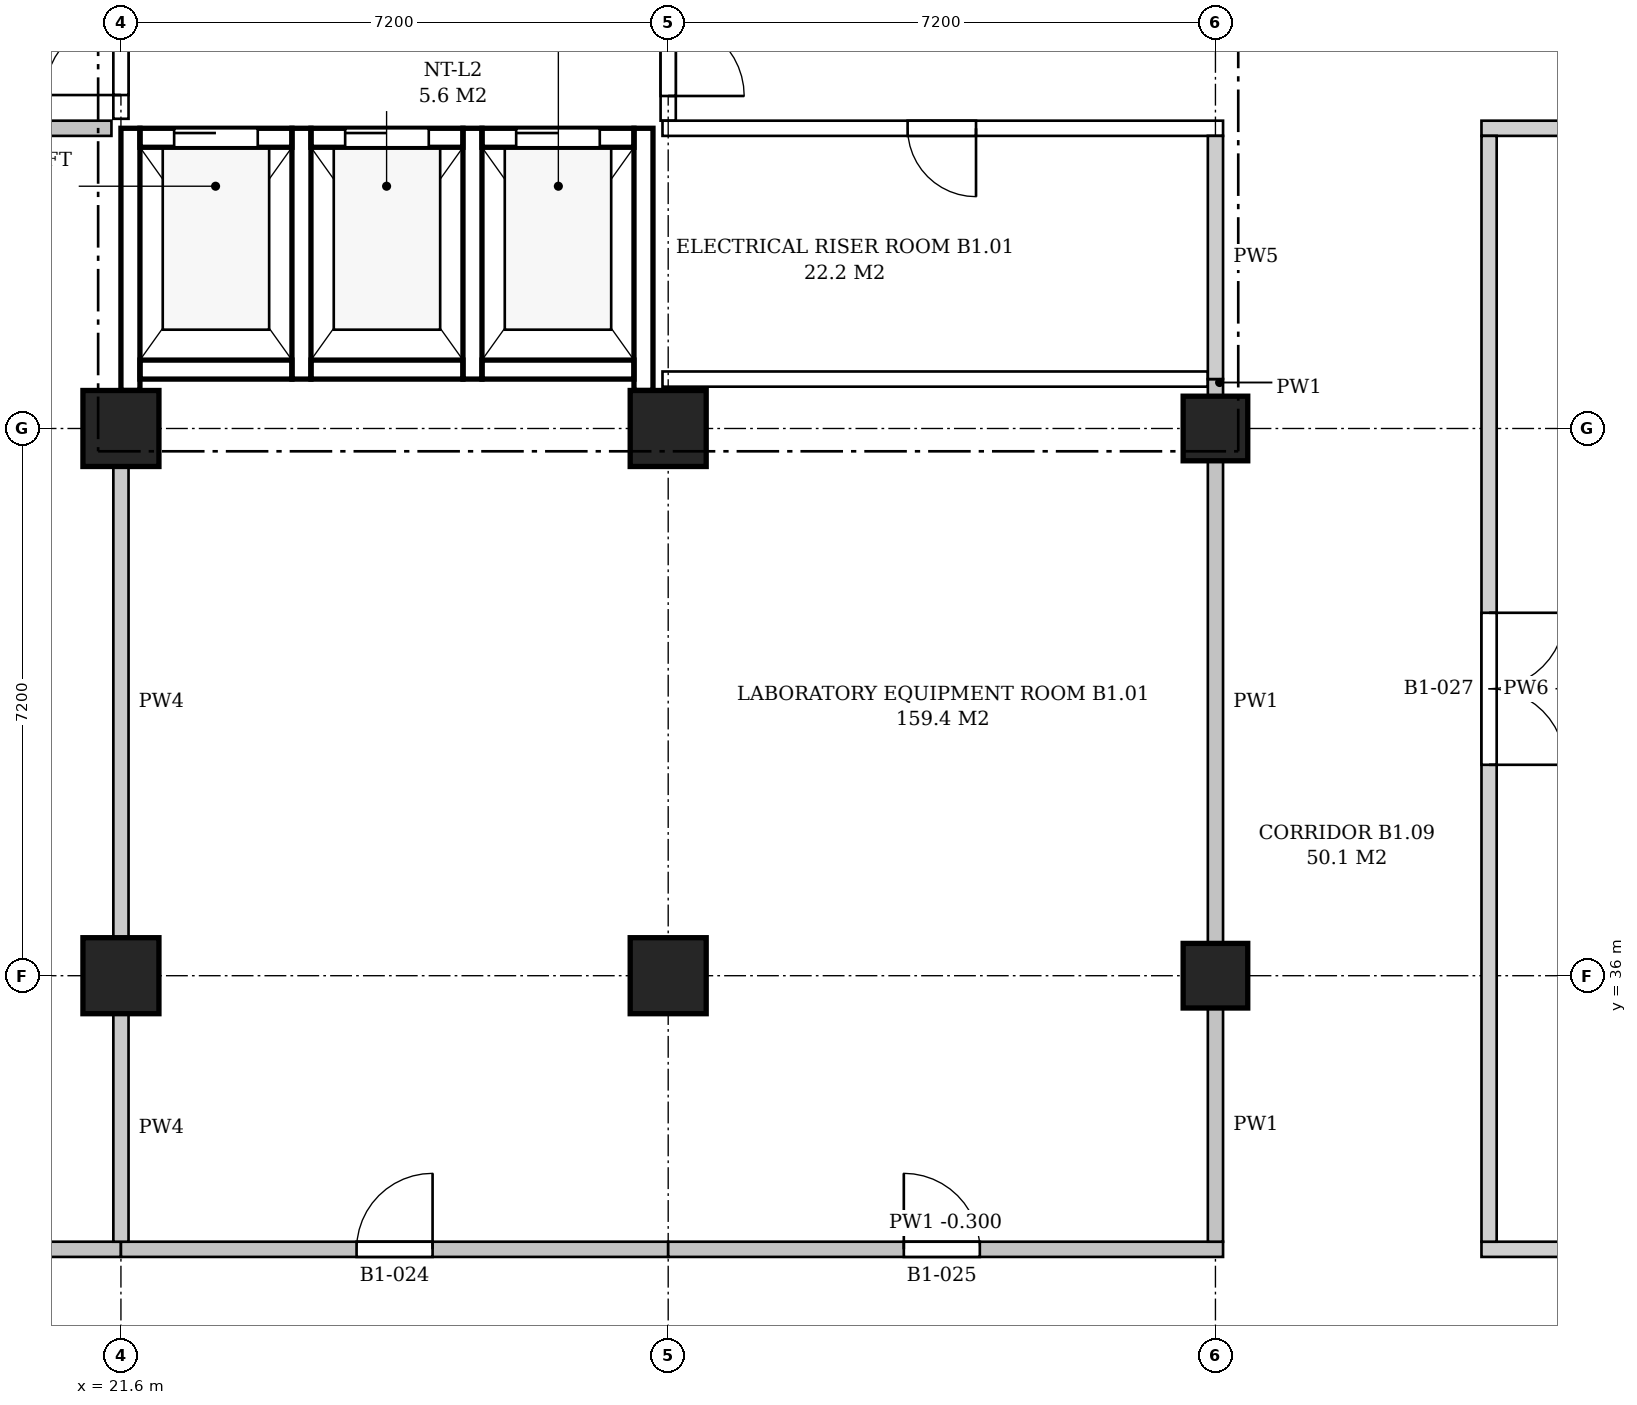
"""IFC4 building model, lengths in metres.
Left out: names, types, materials, properties, quantities, classifications, styles, units other than length and angle.
Written with IfcOpenShell. Run it as: python <this file> out.ifc"""

import sys

from ifc_helpers import new_model, si_unit, direction, frame, frame_2d, origin, origin_2d, place, context, subcontext, project, spatial, polyline, rectangle, outline, extrude, element, fill, save


model = new_model("IFC4")
c1 = context("Model", 3, precision=1e-05, world=origin(), true_north=direction((0.0, 1.0)))
c2 = subcontext(c1, "Body", "Model", "MODEL_VIEW")
j1 = project(units=[si_unit("LENGTHUNIT", "METRE"), si_unit("PLANEANGLEUNIT", "RADIAN")], contexts=[c1])
p1 = place(None, origin())
s1 = spatial("IfcSite", under=j1, at=p1, CompositionType="ELEMENT")
p2 = place(p1, origin())
s2 = spatial("IfcBuilding", under=s1, at=p2, CompositionType="ELEMENT")
p3 = place(p2, frame((0.0, 0.0, -4.5)))
s3 = spatial("IfcBuildingStorey", under=s2, at=p3, CompositionType="ELEMENT", Elevation=-4.5)
for number, where, z_axis, x_axis in (
    (1, (21.6, 36.0, 0.0), (0.0, 0.0, 1.0), (1.0, 0.0, 0.0)),
    (2, (21.6, 43.2, 0.0), (0.0, 0.0, 1.0), (1.0, 0.0, 0.0)),
    (3, (28.8, 36.0, 0.0), (0.0, 0.0, 1.0), (1.0, 0.0, 0.0)),
    (4, (28.8, 43.2, 0.0), (0.0, 0.0, 1.0), (1.0, 0.0, 0.0)),
):
    element("IfcColumn", number, at=place(p3, frame(where, z_axis=z_axis, x_axis=x_axis)), inside=s3, PredefinedType="COLUMN", context=c2, shape_type="SweptSolid", body=[
        extrude(rectangle(XDim=1.0, YDim=1.0, at=origin_2d()), origin(), (0.0, 0.0, 1.0), 4.5),
    ])
for number, where, z_axis, x_axis in (
    (5, (36.0, 36.0, 0.0), (0.0, 0.0, 1.0), (1.0, 0.0, 0.0)),
    (6, (36.0, 43.2, 0.0), (0.0, 0.0, 1.0), (1.0, 0.0, 0.0)),
):
    element("IfcColumn", number, at=place(p3, frame(where, z_axis=z_axis, x_axis=x_axis)), inside=s3, PredefinedType="COLUMN", context=c2, shape_type="SweptSolid", body=[
        extrude(rectangle(XDim=0.85, YDim=0.85, at=origin_2d()), origin(), (0.0, 0.0, 1.0), 4.5),
    ])
p4 = place(p3, frame((21.725, 43.7, -1.6), z_axis=(0.0, 0.0, 1.0), x_axis=(0.0, 1.0, 0.0)))
e7 = element("IfcWall", 7, at=p4, inside=s3, PredefinedType="SHEAR", context=c2, shape_type="SweptSolid", body=[
    extrude(rectangle(XDim=3.45, YDim=0.25, at=frame_2d((1.725, 0.0))), origin(), (0.0, 0.0, 1.0), 5.0),
])
for number, where, z_axis, x_axis in (
    (8, (23.975, 43.85, -1.6), (0.0, 0.0, 1.0), (0.0, 1.0, 0.0)),
    (9, (26.225, 43.85, -1.6), (0.0, 0.0, 1.0), (0.0, 1.0, 0.0)),
):
    element("IfcWall", number, at=place(p3, frame(where, z_axis=z_axis, x_axis=x_axis)), inside=s3, PredefinedType="SHEAR", context=c2, shape_type="SweptSolid", body=[
        extrude(rectangle(XDim=3.3, YDim=0.25, at=frame_2d((1.65, 0.0))), origin(), (0.0, 0.0, 1.0), 5.8),
    ])
p5 = place(p3, frame((28.475, 43.7, -1.6), z_axis=(0.0, 0.0, 1.0), x_axis=(0.0, 1.0, 0.0)))
e10 = element("IfcWall", 10, at=p5, inside=s3, PredefinedType="SHEAR", context=c2, shape_type="SweptSolid", body=[
    extrude(rectangle(XDim=3.45, YDim=0.25, at=frame_2d((1.725, 0.0))), origin(), (0.0, 0.0, 1.0), 5.8),
])
p6 = place(p3, frame((21.85, 47.025, 0.0), z_axis=(0.0, 0.0, 1.0), x_axis=(1.0, 0.0, 0.0)))
e11 = element("IfcWall", 11, at=p6, inside=s3, PredefinedType="SHEAR", context=c2, shape_type="SweptSolid", body=[
    extrude(rectangle(XDim=2.0, YDim=0.25, at=frame_2d((1.0, 0.0))), origin(), (0.0, 0.0, 1.0), 4.2),
])
p7 = place(p6, frame((0.45, 0.0, 0.0)))
e12 = element("IfcOpeningElement", 12, at=p7, cuts=e11, PredefinedType="OPENING", context=c2, shape_type="SweptSolid", body=[
    extrude(rectangle(XDim=1.1, YDim=2.1, at=frame_2d((0.55, 1.05))), frame((0.0, 0.135, 0.0), z_axis=(0.0, -1.0, 0.0), x_axis=(1.0, 0.0, 0.0)), (0.0, 0.0, 1.0), 0.27),
])
p8 = place(p3, frame((21.85, 43.975, -1.6), z_axis=(0.0, 0.0, 1.0), x_axis=(1.0, 0.0, 0.0)))
e13 = element("IfcWall", 13, at=p8, inside=s3, PredefinedType="SHEAR", context=c2, shape_type="SweptSolid", body=[
    extrude(rectangle(XDim=2.0, YDim=0.25, at=frame_2d((1.0, 0.0))), origin(), (0.0, 0.0, 1.0), 5.8),
])
p9 = place(p3, frame((24.1, 47.025, 0.0), z_axis=(0.0, 0.0, 1.0), x_axis=(1.0, 0.0, 0.0)))
e14 = element("IfcWall", 14, at=p9, inside=s3, PredefinedType="SHEAR", context=c2, shape_type="SweptSolid", body=[
    extrude(rectangle(XDim=2.0, YDim=0.25, at=frame_2d((1.0, 0.0))), origin(), (0.0, 0.0, 1.0), 4.2),
])
p10 = place(p9, frame((0.45, 0.0, 0.0)))
e15 = element("IfcOpeningElement", 15, at=p10, cuts=e14, PredefinedType="OPENING", context=c2, shape_type="SweptSolid", body=[
    extrude(rectangle(XDim=1.1, YDim=2.1, at=frame_2d((0.55, 1.05))), frame((0.0, 0.135, 0.0), z_axis=(0.0, -1.0, 0.0), x_axis=(1.0, 0.0, 0.0)), (0.0, 0.0, 1.0), 0.27),
])
p11 = place(p3, frame((24.1, 43.975, -1.6), z_axis=(0.0, 0.0, 1.0), x_axis=(1.0, 0.0, 0.0)))
e16 = element("IfcWall", 16, at=p11, inside=s3, PredefinedType="SHEAR", context=c2, shape_type="SweptSolid", body=[
    extrude(rectangle(XDim=2.0, YDim=0.25, at=frame_2d((1.0, 0.0))), origin(), (0.0, 0.0, 1.0), 5.8),
])
p12 = place(p3, frame((26.35, 47.025, 0.0), z_axis=(0.0, 0.0, 1.0), x_axis=(1.0, 0.0, 0.0)))
e17 = element("IfcWall", 17, at=p12, inside=s3, PredefinedType="SHEAR", context=c2, shape_type="SweptSolid", body=[
    extrude(rectangle(XDim=2.0, YDim=0.25, at=frame_2d((1.0, 0.0))), origin(), (0.0, 0.0, 1.0), 4.2),
])
p13 = place(p12, frame((0.45, 0.0, 0.0)))
e18 = element("IfcOpeningElement", 18, at=p13, cuts=e17, PredefinedType="OPENING", context=c2, shape_type="SweptSolid", body=[
    extrude(rectangle(XDim=1.1, YDim=2.1, at=frame_2d((0.55, 1.05))), frame((0.0, 0.135, 0.0), z_axis=(0.0, -1.0, 0.0), x_axis=(1.0, 0.0, 0.0)), (0.0, 0.0, 1.0), 0.27),
])
p14 = place(p3, frame((26.35, 43.975, -1.6), z_axis=(0.0, 0.0, 1.0), x_axis=(1.0, 0.0, 0.0)))
e19 = element("IfcWall", 19, at=p14, inside=s3, PredefinedType="SHEAR", context=c2, shape_type="SweptSolid", body=[
    extrude(rectangle(XDim=2.0, YDim=0.25, at=frame_2d((1.0, 0.0))), origin(), (0.0, 0.0, 1.0), 5.8),
])
p15 = place(p3, frame((14.4, 32.4, 0.0), z_axis=(0.0, 0.0, 1.0), x_axis=(1.0, 0.0, 0.0)))
e20 = element("IfcWall", 20, at=p15, inside=s3, PredefinedType="PARTITIONING", context=c2, shape_type="SweptSolid", body=[
    extrude(outline(polyline([(0.0, 0.0), (7.2, 0.0), (7.2, 3.4), (6.9, 3.4), (6.9, 4.2), (0.3, 4.2), (0.3, 3.4), (0.0, 3.4), (0.0, 0.0)])), frame((0.0, 0.1, 0.0), z_axis=(0.0, -1.0, 0.0), x_axis=(1.0, 0.0, 0.0)), (0.0, 0.0, 1.0), 0.2),
])
p16 = place(p3, frame((21.6, 32.4, 0.0), z_axis=(0.0, 0.0, 1.0), x_axis=(1.0, 0.0, 0.0)))
e21 = element("IfcWall", 21, at=p16, inside=s3, PredefinedType="PARTITIONING", context=c2, shape_type="SweptSolid", body=[
    extrude(outline(polyline([(0.0, 0.0), (7.2, 0.0), (7.2, 3.4), (6.9, 3.4), (6.9, 4.2), (0.3, 4.2), (0.3, 3.4), (0.0, 3.4), (0.0, 0.0)])), frame((0.0, 0.1, 0.0), z_axis=(0.0, -1.0, 0.0), x_axis=(1.0, 0.0, 0.0)), (0.0, 0.0, 1.0), 0.2),
])
p17 = place(p16, frame((3.1, 0.0, 0.0)))
e22 = element("IfcOpeningElement", 22, at=p17, cuts=e21, PredefinedType="OPENING", context=c2, shape_type="SweptSolid", body=[
    extrude(rectangle(XDim=1.0, YDim=2.1, at=frame_2d((0.5, 1.05))), frame((0.0, 0.11, 0.0), z_axis=(0.0, -1.0, 0.0), x_axis=(1.0, 0.0, 0.0)), (0.0, 0.0, 1.0), 0.22),
])
p18 = place(p3, frame((28.8, 32.4, 0.0), z_axis=(0.0, 0.0, 1.0), x_axis=(1.0, 0.0, 0.0)))
e23 = element("IfcWall", 23, at=p18, inside=s3, PredefinedType="PARTITIONING", context=c2, shape_type="SweptSolid", body=[
    extrude(outline(polyline([(0.0, 0.0), (7.3, 0.0), (7.3, 3.4), (6.9, 3.4), (6.9, 4.2), (0.3, 4.2), (0.3, 3.4), (0.0, 3.4), (0.0, 0.0)])), frame((0.0, 0.1, 0.0), z_axis=(0.0, -1.0, 0.0), x_axis=(1.0, 0.0, 0.0)), (0.0, 0.0, 1.0), 0.2),
])
p19 = place(p18, frame((3.1, 0.0, 0.0)))
e24 = element("IfcOpeningElement", 24, at=p19, cuts=e23, PredefinedType="OPENING", context=c2, shape_type="SweptSolid", body=[
    extrude(rectangle(XDim=1.0, YDim=2.1, at=frame_2d((0.5, 1.05))), frame((0.0, 0.11, 0.0), z_axis=(0.0, -1.0, 0.0), x_axis=(1.0, 0.0, 0.0)), (0.0, 0.0, 1.0), 0.22),
])
p20 = place(p3, frame((39.5, 32.4, 0.0), z_axis=(0.0, 0.0, 1.0), x_axis=(1.0, 0.0, 0.0)))
e25 = element("IfcWall", 25, at=p20, inside=s3, PredefinedType="PARTITIONING", context=c2, shape_type="SweptSolid", body=[
    extrude(outline(polyline([(0.0, 0.0), (10.9, 0.0), (10.9, 3.4), (10.6, 3.4), (10.6, 4.2), (4.0, 4.2), (4.0, 3.4), (3.4, 3.4), (3.4, 4.2), (0.0, 4.2), (0.0, 0.0)])), frame((0.0, 0.1, 0.0), z_axis=(0.0, -1.0, 0.0), x_axis=(1.0, 0.0, 0.0)), (0.0, 0.0, 1.0), 0.2),
])
p21 = place(p3, frame((28.725, 43.85, 0.0), z_axis=(0.0, 0.0, 1.0), x_axis=(1.0, 0.0, 0.0)))
e26 = element("IfcWall", 26, at=p21, inside=s3, PredefinedType="SOLIDWALL", context=c2, shape_type="SweptSolid", body=[
    extrude(outline(polyline([(0.0, 0.0), (7.175, 0.0), (7.175, 3.4), (6.975, 3.4), (6.975, 4.2), (0.375, 4.2), (0.375, 3.4), (0.0, 3.4), (0.0, 0.0)])), frame((0.0, 0.1, 0.0), z_axis=(0.0, -1.0, 0.0), x_axis=(1.0, 0.0, 0.0)), (0.0, 0.0, 1.0), 0.2),
])
p22 = place(p3, frame((3.5, 47.15, 0.0), z_axis=(0.0, 0.0, 1.0), x_axis=(1.0, 0.0, 0.0)))
e27 = element("IfcWall", 27, at=p22, inside=s3, PredefinedType="PARTITIONING", context=c2, shape_type="SweptSolid", body=[
    extrude(outline(polyline([(0.0, 0.0), (17.975, 0.0), (17.975, 3.4), (17.8, 3.4), (17.8, 4.2), (11.2, 4.2), (11.2, 3.4), (10.6, 3.4), (10.6, 4.2), (4.0, 4.2), (4.0, 3.4), (3.4, 3.4), (3.4, 4.2), (0.0, 4.2), (0.0, 0.0)])), frame((0.0, 0.1, 0.0), z_axis=(0.0, -1.0, 0.0), x_axis=(1.0, 0.0, 0.0)), (0.0, 0.0, 1.0), 0.2),
])
p23 = place(p22, frame((13.938, 0.0, 0.0)))
e28 = element("IfcOpeningElement", 28, at=p23, cuts=e27, PredefinedType="OPENING", context=c2, shape_type="SweptSolid", body=[
    extrude(rectangle(XDim=1.0, YDim=2.1, at=frame_2d((0.5, 1.05))), frame((0.0, 0.11, 0.0), z_axis=(0.0, -1.0, 0.0), x_axis=(1.0, 0.0, 0.0)), (0.0, 0.0, 1.0), 0.22),
])
p24 = place(p3, frame((28.725, 47.15, 0.0), z_axis=(0.0, 0.0, 1.0), x_axis=(1.0, 0.0, 0.0)))
e29 = element("IfcWall", 29, at=p24, inside=s3, PredefinedType="SOLIDWALL", context=c2, shape_type="SweptSolid", body=[
    extrude(outline(polyline([(0.0, 0.0), (7.375, 0.0), (7.375, 3.4), (6.975, 3.4), (6.975, 4.2), (0.375, 4.2), (0.375, 3.4), (0.0, 3.4), (0.0, 0.0)])), frame((0.0, 0.1, 0.0), z_axis=(0.0, -1.0, 0.0), x_axis=(1.0, 0.0, 0.0)), (0.0, 0.0, 1.0), 0.2),
])
p25 = place(p24, frame((3.225, 0.0, 0.0)))
e30 = element("IfcOpeningElement", 30, at=p25, cuts=e29, PredefinedType="OPENING", context=c2, shape_type="SweptSolid", body=[
    extrude(rectangle(XDim=0.9, YDim=2.1, at=frame_2d((0.45, 1.05))), frame((0.0, 0.11, 0.0), z_axis=(0.0, -1.0, 0.0), x_axis=(1.0, 0.0, 0.0)), (0.0, 0.0, 1.0), 0.22),
])
p26 = place(p3, frame((39.5, 47.15, 0.0), z_axis=(0.0, 0.0, 1.0), x_axis=(1.0, 0.0, 0.0)))
e31 = element("IfcWall", 31, at=p26, inside=s3, PredefinedType="PARTITIONING", context=c2, shape_type="SweptSolid", body=[
    extrude(outline(polyline([(0.0, 0.0), (10.9, 0.0), (10.9, 3.4), (10.6, 3.4), (10.6, 4.2), (4.0, 4.2), (4.0, 3.4), (3.4, 3.4), (3.4, 4.2), (0.0, 4.2), (0.0, 0.0)])), frame((0.0, 0.1, 0.0), z_axis=(0.0, -1.0, 0.0), x_axis=(1.0, 0.0, 0.0)), (0.0, 0.0, 1.0), 0.2),
])
p27 = place(p3, frame((21.6, 32.5, 0.0), z_axis=(0.0, 0.0, 1.0), x_axis=(0.0, 1.0, 0.0)))
e32 = element("IfcWall", 32, at=p27, inside=s3, PredefinedType="PARTITIONING", context=c2, shape_type="SweptSolid", body=[
    extrude(rectangle(XDim=3.0, YDim=0.2, at=frame_2d((1.5, 0.0))), origin(), (0.0, 0.0, 1.0), 3.4),
])
p28 = place(p3, frame((21.6, 36.5, 0.0), z_axis=(0.0, 0.0, 1.0), x_axis=(0.0, 1.0, 0.0)))
e33 = element("IfcWall", 33, at=p28, inside=s3, PredefinedType="PARTITIONING", context=c2, shape_type="SweptSolid", body=[
    extrude(rectangle(XDim=6.2, YDim=0.2, at=frame_2d((3.1, 0.0))), origin(), (0.0, 0.0, 1.0), 3.4),
])
p29 = place(p3, frame((21.6, 47.275, 0.0), z_axis=(0.0, 0.0, 1.0), x_axis=(0.0, 1.0, 0.0)))
e34 = element("IfcWall", 34, at=p29, inside=s3, PredefinedType="PARTITIONING", context=c2, shape_type="SweptSolid", body=[
    extrude(rectangle(XDim=2.625, YDim=0.2, at=frame_2d((1.312, 0.0))), origin(), (0.0, 0.0, 1.0), 3.4),
])
p30 = place(p29, frame((0.312, 0.0, 0.0)))
e35 = element("IfcOpeningElement", 35, at=p30, cuts=e34, PredefinedType="OPENING", context=c2, shape_type="SweptSolid", body=[
    extrude(rectangle(XDim=2.0, YDim=2.4, at=frame_2d((1.0, 1.2))), frame((0.0, 0.11, 0.0), z_axis=(0.0, -1.0, 0.0), x_axis=(1.0, 0.0, 0.0)), (0.0, 0.0, 1.0), 0.22),
])
p31 = place(p3, frame((28.8, 47.25, 0.0), z_axis=(0.0, 0.0, 1.0), x_axis=(0.0, 1.0, 0.0)))
e36 = element("IfcWall", 36, at=p31, inside=s3, PredefinedType="PARTITIONING", context=c2, shape_type="SweptSolid", body=[
    extrude(rectangle(XDim=2.65, YDim=0.2, at=frame_2d((1.325, 0.0))), origin(), (0.0, 0.0, 1.0), 3.4),
])
p32 = place(p31, frame((0.325, 0.0, 0.0)))
e37 = element("IfcOpeningElement", 37, at=p32, cuts=e36, PredefinedType="OPENING", context=c2, shape_type="SweptSolid", body=[
    extrude(rectangle(XDim=2.0, YDim=2.4, at=frame_2d((1.0, 1.2))), frame((0.0, 0.11, 0.0), z_axis=(0.0, -1.0, 0.0), x_axis=(1.0, 0.0, 0.0)), (0.0, 0.0, 1.0), 0.22),
])
p33 = place(p3, frame((36.0, 32.5, 0.0), z_axis=(0.0, 0.0, 1.0), x_axis=(0.0, 1.0, 0.0)))
e38 = element("IfcWall", 38, at=p33, inside=s3, PredefinedType="PARTITIONING", context=c2, shape_type="SweptSolid", body=[
    extrude(rectangle(XDim=3.075, YDim=0.2, at=frame_2d((1.538, 0.0))), origin(), (0.0, 0.0, 1.0), 3.4),
])
p34 = place(p3, frame((36.0, 36.425, 0.0), z_axis=(0.0, 0.0, 1.0), x_axis=(0.0, 1.0, 0.0)))
e39 = element("IfcWall", 39, at=p34, inside=s3, PredefinedType="PARTITIONING", context=c2, shape_type="SweptSolid", body=[
    extrude(rectangle(XDim=6.35, YDim=0.2, at=frame_2d((3.175, 0.0))), origin(), (0.0, 0.0, 1.0), 3.4),
])
p35 = place(p3, frame((36.0, 43.625, 0.0), z_axis=(0.0, 0.0, 1.0), x_axis=(0.0, 1.0, 0.0)))
e40 = element("IfcWall", 40, at=p35, inside=s3, PredefinedType="PARTITIONING", context=c2, shape_type="SweptSolid", body=[
    extrude(rectangle(XDim=0.225, YDim=0.2, at=frame_2d((0.113, 0.0))), origin(), (0.0, 0.0, 1.0), 3.4),
])
p36 = place(p3, frame((36.0, 43.85, 0.0), z_axis=(0.0, 0.0, 1.0), x_axis=(0.0, 1.0, 0.0)))
e41 = element("IfcWall", 41, at=p36, inside=s3, PredefinedType="SOLIDWALL", context=c2, shape_type="SweptSolid", body=[
    extrude(rectangle(XDim=3.2, YDim=0.2, at=frame_2d((1.6, 0.0))), origin(), (0.0, 0.0, 1.0), 3.4),
])
p37 = place(p3, frame((39.6, 32.5, 0.0), z_axis=(0.0, 0.0, 1.0), x_axis=(0.0, 1.0, 0.0)))
e42 = element("IfcWall", 42, at=p37, inside=s3, PredefinedType="PARTITIONING", context=c2, shape_type="SweptSolid", body=[
    extrude(outline(polyline([(0.0, 0.0), (14.55, 0.0), (14.55, 4.2), (11.0, 4.2), (11.0, 3.4), (10.4, 3.4), (10.4, 4.2), (3.8, 4.2), (3.8, 3.4), (3.2, 3.4), (3.2, 4.2), (0.0, 4.2), (0.0, 0.0)])), frame((0.0, 0.1, 0.0), z_axis=(0.0, -1.0, 0.0), x_axis=(1.0, 0.0, 0.0)), (0.0, 0.0, 1.0), 0.2),
])
p38 = place(p37, frame((6.275, 0.0, 0.0)))
e43 = element("IfcOpeningElement", 43, at=p38, cuts=e42, PredefinedType="OPENING", context=c2, shape_type="SweptSolid", body=[
    extrude(rectangle(XDim=2.0, YDim=2.1, at=frame_2d((1.0, 1.05))), frame((0.0, 0.11, 0.0), z_axis=(0.0, -1.0, 0.0), x_axis=(1.0, 0.0, 0.0)), (0.0, 0.0, 1.0), 0.22),
])
p39 = place(p7, origin())
e44 = element("IfcDoor", 44, at=p39, inside=s3, OperationType="SLIDING_TO_LEFT", PredefinedType="DOOR", context=c2, shape_type="SweptSolid", body=[
    extrude(rectangle(XDim=1.1, YDim=2.1, at=frame_2d((0.55, 1.05))), frame((0.0, 0.025, 0.0), z_axis=(0.0, -1.0, 0.0), x_axis=(1.0, 0.0, 0.0)), (0.0, 0.0, 1.0), 0.05),
])
fill(e12, e44)
p40 = place(p10, origin())
e45 = element("IfcDoor", 45, at=p40, inside=s3, OperationType="SLIDING_TO_LEFT", PredefinedType="DOOR", context=c2, shape_type="SweptSolid", body=[
    extrude(rectangle(XDim=1.1, YDim=2.1, at=frame_2d((0.55, 1.05))), frame((0.0, 0.025, 0.0), z_axis=(0.0, -1.0, 0.0), x_axis=(1.0, 0.0, 0.0)), (0.0, 0.0, 1.0), 0.05),
])
fill(e15, e45)
p41 = place(p13, origin())
e46 = element("IfcDoor", 46, at=p41, inside=s3, OperationType="SLIDING_TO_LEFT", PredefinedType="DOOR", context=c2, shape_type="SweptSolid", body=[
    extrude(rectangle(XDim=1.1, YDim=2.1, at=frame_2d((0.55, 1.05))), frame((0.0, 0.025, 0.0), z_axis=(0.0, -1.0, 0.0), x_axis=(1.0, 0.0, 0.0)), (0.0, 0.0, 1.0), 0.05),
])
fill(e18, e46)
p42 = place(p30, origin())
e47 = element("IfcDoor", 47, at=p42, inside=s3, OperationType="DOUBLE_DOOR_SINGLE_SWING", PredefinedType="DOOR", context=c2, shape_type="SweptSolid", body=[
    extrude(rectangle(XDim=2.0, YDim=2.4, at=frame_2d((1.0, 1.2))), frame((0.0, 0.025, 0.0), z_axis=(0.0, -1.0, 0.0), x_axis=(1.0, 0.0, 0.0)), (0.0, 0.0, 1.0), 0.05),
])
fill(e35, e47)
p43 = place(p32, origin())
e48 = element("IfcDoor", 48, at=p43, inside=s3, OperationType="DOUBLE_DOOR_SINGLE_SWING", PredefinedType="DOOR", context=c2, shape_type="SweptSolid", body=[
    extrude(rectangle(XDim=2.0, YDim=2.4, at=frame_2d((1.0, 1.2))), frame((0.0, 0.025, 0.0), z_axis=(0.0, -1.0, 0.0), x_axis=(1.0, 0.0, 0.0)), (0.0, 0.0, 1.0), 0.05),
])
fill(e37, e48)
p44 = place(p17, origin())
e49 = element("IfcDoor", 49, at=p44, inside=s3, OperationType="SINGLE_SWING_RIGHT", PredefinedType="DOOR", context=c2, shape_type="SweptSolid", body=[
    extrude(rectangle(XDim=1.0, YDim=2.1, at=frame_2d((0.5, 1.05))), frame((0.0, 0.025, 0.0), z_axis=(0.0, -1.0, 0.0), x_axis=(1.0, 0.0, 0.0)), (0.0, 0.0, 1.0), 0.05),
])
fill(e22, e49)
p45 = place(p19, origin())
e50 = element("IfcDoor", 50, at=p45, inside=s3, OperationType="SINGLE_SWING_LEFT", PredefinedType="DOOR", context=c2, shape_type="SweptSolid", body=[
    extrude(rectangle(XDim=1.0, YDim=2.1, at=frame_2d((0.5, 1.05))), frame((0.0, 0.025, 0.0), z_axis=(0.0, -1.0, 0.0), x_axis=(1.0, 0.0, 0.0)), (0.0, 0.0, 1.0), 0.05),
])
fill(e24, e50)
p46 = place(p25, frame((0.9, 0.0, 0.0), z_axis=(0.0, 0.0, 1.0), x_axis=(-1.0, 0.0, 0.0)))
e51 = element("IfcDoor", 51, at=p46, inside=s3, OperationType="SINGLE_SWING_LEFT", PredefinedType="DOOR", context=c2, shape_type="SweptSolid", body=[
    extrude(rectangle(XDim=0.9, YDim=2.1, at=frame_2d((0.45, 1.05))), frame((0.0, 0.025, 0.0), z_axis=(0.0, -1.0, 0.0), x_axis=(1.0, 0.0, 0.0)), (0.0, 0.0, 1.0), 0.05),
])
fill(e30, e51)
p47 = place(p38, origin())
e52 = element("IfcDoor", 52, at=p47, inside=s3, OperationType="DOUBLE_DOOR_SINGLE_SWING", PredefinedType="DOOR", context=c2, shape_type="SweptSolid", body=[
    extrude(rectangle(XDim=2.0, YDim=2.1, at=frame_2d((1.0, 1.05))), frame((0.0, 0.025, 0.0), z_axis=(0.0, -1.0, 0.0), x_axis=(1.0, 0.0, 0.0)), (0.0, 0.0, 1.0), 0.05),
])
fill(e43, e52)
save(model, sys.argv[1])
